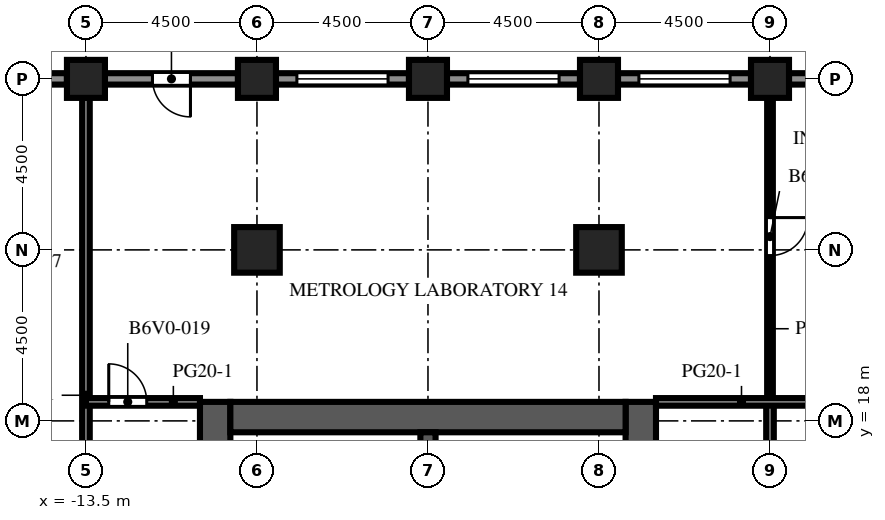
"""IFC4 building model, lengths in metres.
Left out: names, types, materials, properties, quantities, classifications, styles, units other than length and angle.
Written with IfcOpenShell. Run it as: python <this file> out.ifc"""

import sys

from ifc_helpers import new_model, si_unit, direction, frame, frame_2d, origin, origin_2d, place, context, subcontext, project, spatial, rectangle, extrude, element, fill, save


model = new_model("IFC4")
c1 = context("Model", 3, precision=1e-05, world=origin(), true_north=direction((0.0, 1.0)))
c2 = subcontext(c1, "Body", "Model", "MODEL_VIEW")
j1 = project(units=[si_unit("LENGTHUNIT", "METRE"), si_unit("PLANEANGLEUNIT", "RADIAN")], contexts=[c1])
p1 = place(None, origin())
s1 = spatial("IfcSite", under=j1, at=p1, CompositionType="ELEMENT")
p2 = place(p1, origin())
s2 = spatial("IfcBuilding", under=s1, at=p2, CompositionType="ELEMENT")
p3 = place(p2, frame((0.0, 0.0, 199.7)))
s3 = spatial("IfcBuildingStorey", under=s2, at=p3, CompositionType="ELEMENT", Elevation=199.7)
for number, where, z_axis, x_axis in (
    (1, (-13.5, 27.0, 0.0), (0.0, 0.0, 1.0), (1.0, 0.0, 0.0)),
    (2, (-9.0, 27.0, 0.0), (0.0, 0.0, 1.0), (1.0, 0.0, 0.0)),
    (3, (-4.5, 27.0, 0.0), (0.0, 0.0, 1.0), (1.0, 0.0, 0.0)),
    (4, (0.0, 27.0, 0.0), (0.0, 0.0, 1.0), (1.0, 0.0, 0.0)),
    (5, (4.5, 27.0, 0.0), (0.0, 0.0, 1.0), (1.0, 0.0, 0.0)),
):
    element("IfcColumn", number, at=place(p3, frame(where, z_axis=z_axis, x_axis=x_axis)), inside=s3, PredefinedType="COLUMN", context=c2, shape_type="SweptSolid", body=[
        extrude(rectangle(XDim=1.0, YDim=1.0, at=origin_2d()), origin(), (0.0, 0.0, 1.0), 4.1),
    ])
for number, where, z_axis, x_axis in (
    (6, (-9.0, 22.5, 0.0), (0.0, 0.0, 1.0), (1.0, 0.0, 0.0)),
    (7, (0.0, 22.5, 0.0), (0.0, 0.0, 1.0), (1.0, 0.0, 0.0)),
):
    element("IfcColumn", number, at=place(p3, frame(where, z_axis=z_axis, x_axis=x_axis)), inside=s3, PredefinedType="COLUMN", context=c2, shape_type="SweptSolid", body=[
        extrude(rectangle(XDim=1.2, YDim=1.2, at=origin_2d()), origin(), (0.0, 0.0, 1.0), 4.1),
    ])
p4 = place(p3, frame((-10.1, -9.0, 0.0), z_axis=(0.0, 0.0, 1.0), x_axis=(0.0, 1.0, 0.0)))
e8 = element("IfcWall", 8, at=p4, inside=s3, PredefinedType="SHEAR", context=c2, shape_type="SweptSolid", body=[
    extrude(rectangle(XDim=27.5, YDim=0.8, at=frame_2d((13.75, 0.0))), origin(), (0.0, 0.0, 1.0), 4.1),
])
p5 = place(p4, frame((12.55, 0.0, 0.0)))
e9 = element("IfcOpeningElement", 9, at=p5, cuts=e8, PredefinedType="OPENING", context=c2, shape_type="SweptSolid", body=[
    extrude(rectangle(XDim=2.4, YDim=2.4, at=frame_2d((1.2, 1.2))), frame((0.0, 0.41, 0.0), z_axis=(0.0, -1.0, 0.0), x_axis=(1.0, 0.0, 0.0)), (0.0, 0.0, 1.0), 0.82),
])
p6 = place(p4, frame((6.825, 0.0, 0.0)))
e10 = element("IfcOpeningElement", 10, at=p6, cuts=e8, PredefinedType="OPENING", context=c2, shape_type="SweptSolid", body=[
    extrude(rectangle(XDim=1.2, YDim=2.1, at=frame_2d((0.6, 1.05))), frame((0.0, 0.41, 0.0), z_axis=(0.0, -1.0, 0.0), x_axis=(1.0, 0.0, 0.0)), (0.0, 0.0, 1.0), 0.82),
])
p7 = place(p4, frame((19.475, 0.0, 0.0)))
e11 = element("IfcOpeningElement", 11, at=p7, cuts=e8, PredefinedType="OPENING", context=c2, shape_type="SweptSolid", body=[
    extrude(rectangle(XDim=1.2, YDim=2.1, at=frame_2d((0.6, 1.05))), frame((0.0, 0.41, 0.0), z_axis=(0.0, -1.0, 0.0), x_axis=(1.0, 0.0, 0.0)), (0.0, 0.0, 1.0), 0.82),
])
p8 = place(p3, frame((1.1, -9.0, 0.0), z_axis=(0.0, 0.0, 1.0), x_axis=(0.0, 1.0, 0.0)))
e12 = element("IfcWall", 12, at=p8, inside=s3, PredefinedType="SHEAR", context=c2, shape_type="SweptSolid", body=[
    extrude(rectangle(XDim=27.5, YDim=0.8, at=frame_2d((13.75, 0.0))), origin(), (0.0, 0.0, 1.0), 4.1),
])
p9 = place(p8, frame((12.55, 0.0, 0.0)))
e13 = element("IfcOpeningElement", 13, at=p9, cuts=e12, PredefinedType="OPENING", context=c2, shape_type="SweptSolid", body=[
    extrude(rectangle(XDim=2.4, YDim=2.4, at=frame_2d((1.2, 1.2))), frame((0.0, 0.41, 0.0), z_axis=(0.0, -1.0, 0.0), x_axis=(1.0, 0.0, 0.0)), (0.0, 0.0, 1.0), 0.82),
])
p10 = place(p8, frame((3.95, 0.0, 0.0)))
e14 = element("IfcOpeningElement", 14, at=p10, cuts=e12, PredefinedType="OPENING", context=c2, shape_type="SweptSolid", body=[
    extrude(rectangle(XDim=1.2, YDim=2.1, at=frame_2d((0.6, 1.05))), frame((0.0, 0.41, 0.0), z_axis=(0.0, -1.0, 0.0), x_axis=(1.0, 0.0, 0.0)), (0.0, 0.0, 1.0), 0.82),
])
p11 = place(p8, frame((19.45, 0.0, 0.0)))
e15 = element("IfcOpeningElement", 15, at=p11, cuts=e12, PredefinedType="OPENING", context=c2, shape_type="SweptSolid", body=[
    extrude(rectangle(XDim=1.0, YDim=2.1, at=frame_2d((0.5, 1.05))), frame((0.0, 0.41, 0.0), z_axis=(0.0, -1.0, 0.0), x_axis=(1.0, 0.0, 0.0)), (0.0, 0.0, 1.0), 0.82),
])
p12 = place(p8, frame((21.137, 0.0, 0.0)))
e16 = element("IfcOpeningElement", 16, at=p12, cuts=e12, PredefinedType="OPENING", context=c2, shape_type="SweptSolid", body=[
    extrude(rectangle(XDim=1.0, YDim=2.1, at=frame_2d((0.5, 1.05))), frame((0.0, 0.41, 0.0), z_axis=(0.0, -1.0, 0.0), x_axis=(1.0, 0.0, 0.0)), (0.0, 0.0, 1.0), 0.82),
])
p13 = place(p8, frame((23.2, 0.0, 0.0)))
e17 = element("IfcOpeningElement", 17, at=p13, cuts=e12, PredefinedType="OPENING", context=c2, shape_type="SweptSolid", body=[
    extrude(rectangle(XDim=1.0, YDim=2.1, at=frame_2d((0.5, 1.05))), frame((0.0, 0.41, 0.0), z_axis=(0.0, -1.0, 0.0), x_axis=(1.0, 0.0, 0.0)), (0.0, 0.0, 1.0), 0.82),
])
p14 = place(p8, frame((25.262, 0.0, 0.0)))
e18 = element("IfcOpeningElement", 18, at=p14, cuts=e12, PredefinedType="OPENING", context=c2, shape_type="SweptSolid", body=[
    extrude(rectangle(XDim=1.0, YDim=2.1, at=frame_2d((0.5, 1.05))), frame((0.0, 0.41, 0.0), z_axis=(0.0, -1.0, 0.0), x_axis=(1.0, 0.0, 0.0)), (0.0, 0.0, 1.0), 0.82),
])
p15 = place(p3, frame((-9.7, 18.1, 0.0), z_axis=(0.0, 0.0, 1.0), x_axis=(1.0, 0.0, 0.0)))
e19 = element("IfcWall", 19, at=p15, inside=s3, PredefinedType="SHEAR", context=c2, shape_type="SweptSolid", body=[
    extrude(rectangle(XDim=10.4, YDim=0.8, at=frame_2d((5.2, 0.0))), origin(), (0.0, 0.0, 1.0), 4.1),
])
p16 = place(p3, frame((-4.5, 10.2, 0.0), z_axis=(0.0, 0.0, 1.0), x_axis=(0.0, 1.0, 0.0)))
e20 = element("IfcWall", 20, at=p16, inside=s3, PredefinedType="SHEAR", context=c2, shape_type="SweptSolid", body=[
    extrude(rectangle(XDim=7.5, YDim=0.4, at=frame_2d((3.75, 0.0))), origin(), (0.0, 0.0, 1.0), 4.1),
])
p17 = place(p3, frame((5.0, 27.0, 0.0), z_axis=(0.0, 0.0, 1.0), x_axis=(1.0, 0.0, 0.0)))
e21 = element("IfcWall", 21, at=p17, inside=s3, PredefinedType="SOLIDWALL", context=c2, shape_type="SweptSolid", body=[
    extrude(rectangle(XDim=3.5, YDim=0.3, at=frame_2d((1.75, 0.0))), origin(), (0.0, 0.0, 1.0), 2.85),
])
p18 = place(p17, frame((0.55, 0.0, 0.8)))
e22 = element("IfcOpeningElement", 22, at=p18, cuts=e21, PredefinedType="OPENING", context=c2, shape_type="SweptSolid", body=[
    extrude(rectangle(XDim=2.4, YDim=1.7, at=frame_2d((1.2, 0.85))), frame((0.0, 0.16, 0.0), z_axis=(0.0, -1.0, 0.0), x_axis=(1.0, 0.0, 0.0)), (0.0, 0.0, 1.0), 0.32),
])
p19 = place(p3, frame((0.5, 27.0, 0.0), z_axis=(0.0, 0.0, 1.0), x_axis=(1.0, 0.0, 0.0)))
e23 = element("IfcWall", 23, at=p19, inside=s3, PredefinedType="SOLIDWALL", context=c2, shape_type="SweptSolid", body=[
    extrude(rectangle(XDim=3.5, YDim=0.3, at=frame_2d((1.75, 0.0))), origin(), (0.0, 0.0, 1.0), 2.85),
])
p20 = place(p19, frame((0.55, 0.0, 0.8)))
e24 = element("IfcOpeningElement", 24, at=p20, cuts=e23, PredefinedType="OPENING", context=c2, shape_type="SweptSolid", body=[
    extrude(rectangle(XDim=2.4, YDim=1.7, at=frame_2d((1.2, 0.85))), frame((0.0, 0.16, 0.0), z_axis=(0.0, -1.0, 0.0), x_axis=(1.0, 0.0, 0.0)), (0.0, 0.0, 1.0), 0.32),
])
p21 = place(p3, frame((-4.0, 27.0, 0.0), z_axis=(0.0, 0.0, 1.0), x_axis=(1.0, 0.0, 0.0)))
e25 = element("IfcWall", 25, at=p21, inside=s3, PredefinedType="SOLIDWALL", context=c2, shape_type="SweptSolid", body=[
    extrude(rectangle(XDim=3.5, YDim=0.3, at=frame_2d((1.75, 0.0))), origin(), (0.0, 0.0, 1.0), 2.85),
])
p22 = place(p21, frame((0.55, 0.0, 0.8)))
e26 = element("IfcOpeningElement", 26, at=p22, cuts=e25, PredefinedType="OPENING", context=c2, shape_type="SweptSolid", body=[
    extrude(rectangle(XDim=2.4, YDim=1.7, at=frame_2d((1.2, 0.85))), frame((0.0, 0.16, 0.0), z_axis=(0.0, -1.0, 0.0), x_axis=(1.0, 0.0, 0.0)), (0.0, 0.0, 1.0), 0.32),
])
p23 = place(p3, frame((-8.5, 27.0, 0.0), z_axis=(0.0, 0.0, 1.0), x_axis=(1.0, 0.0, 0.0)))
e27 = element("IfcWall", 27, at=p23, inside=s3, PredefinedType="SOLIDWALL", context=c2, shape_type="SweptSolid", body=[
    extrude(rectangle(XDim=3.5, YDim=0.3, at=frame_2d((1.75, 0.0))), origin(), (0.0, 0.0, 1.0), 2.85),
])
p24 = place(p23, frame((0.55, 0.0, 0.8)))
e28 = element("IfcOpeningElement", 28, at=p24, cuts=e27, PredefinedType="OPENING", context=c2, shape_type="SweptSolid", body=[
    extrude(rectangle(XDim=2.4, YDim=1.7, at=frame_2d((1.2, 0.85))), frame((0.0, 0.16, 0.0), z_axis=(0.0, -1.0, 0.0), x_axis=(1.0, 0.0, 0.0)), (0.0, 0.0, 1.0), 0.32),
])
p25 = place(p3, frame((-13.0, 27.0, 0.0), z_axis=(0.0, 0.0, 1.0), x_axis=(1.0, 0.0, 0.0)))
e29 = element("IfcWall", 29, at=p25, inside=s3, PredefinedType="SOLIDWALL", context=c2, shape_type="SweptSolid", body=[
    extrude(rectangle(XDim=3.5, YDim=0.3, at=frame_2d((1.75, 0.0))), origin(), (0.0, 0.0, 1.0), 2.85),
])
p26 = place(p25, frame((1.25, 0.0, 0.0)))
e30 = element("IfcOpeningElement", 30, at=p26, cuts=e29, PredefinedType="OPENING", context=c2, shape_type="SweptSolid", body=[
    extrude(rectangle(XDim=1.0, YDim=2.2, at=frame_2d((0.5, 1.1))), frame((0.0, 0.16, 0.0), z_axis=(0.0, -1.0, 0.0), x_axis=(1.0, 0.0, 0.0)), (0.0, 0.0, 1.0), 0.32),
])
p27 = place(p3, frame((-17.5, 27.0, 0.0), z_axis=(0.0, 0.0, 1.0), x_axis=(1.0, 0.0, 0.0)))
e31 = element("IfcWall", 31, at=p27, inside=s3, PredefinedType="SOLIDWALL", context=c2, shape_type="SweptSolid", body=[
    extrude(rectangle(XDim=3.5, YDim=0.3, at=frame_2d((1.75, 0.0))), origin(), (0.0, 0.0, 1.0), 2.85),
])
p28 = place(p27, frame((0.55, 0.0, 0.8)))
e32 = element("IfcOpeningElement", 32, at=p28, cuts=e31, PredefinedType="OPENING", context=c2, shape_type="SweptSolid", body=[
    extrude(rectangle(XDim=2.4, YDim=1.7, at=frame_2d((1.2, 0.85))), frame((0.0, 0.16, 0.0), z_axis=(0.0, -1.0, 0.0), x_axis=(1.0, 0.0, 0.0)), (0.0, 0.0, 1.0), 0.32),
])
p29 = place(p3, frame((-13.5, 6.25, 0.0), z_axis=(0.0, 0.0, 1.0), x_axis=(0.0, 1.0, 0.0)))
e33 = element("IfcWall", 33, at=p29, inside=s3, PredefinedType="PARTITIONING", context=c2, shape_type="SweptSolid", body=[
    extrude(rectangle(XDim=20.25, YDim=0.2, at=frame_2d((10.125, 0.0))), origin(), (0.0, 0.0, 1.0), 3.65),
])
p30 = place(p29, frame((3.6, 0.0, 0.0)))
e34 = element("IfcOpeningElement", 34, at=p30, cuts=e33, PredefinedType="OPENING", context=c2, shape_type="SweptSolid", body=[
    extrude(rectangle(XDim=1.0, YDim=2.1, at=frame_2d((0.5, 1.05))), frame((0.0, 0.11, 0.0), z_axis=(0.0, -1.0, 0.0), x_axis=(1.0, 0.0, 0.0)), (0.0, 0.0, 1.0), 0.22),
])
p31 = place(p3, frame((4.5, 26.5, 0.0), z_axis=(0.0, 0.0, 1.0), x_axis=(0.0, -1.0, 0.0)))
e35 = element("IfcWall", 35, at=p31, inside=s3, PredefinedType="PARTITIONING", context=c2, shape_type="SweptSolid", body=[
    extrude(rectangle(XDim=8.0, YDim=0.15, at=frame_2d((4.0, 0.0))), origin(), (0.0, 0.0, 1.0), 3.65),
])
p32 = place(p31, frame((3.15, 0.0, 0.0)))
e36 = element("IfcOpeningElement", 36, at=p32, cuts=e35, PredefinedType="OPENING", context=c2, shape_type="SweptSolid", body=[
    extrude(rectangle(XDim=1.0, YDim=2.1, at=frame_2d((0.5, 1.05))), frame((0.0, 0.085, 0.0), z_axis=(0.0, -1.0, 0.0), x_axis=(1.0, 0.0, 0.0)), (0.0, 0.0, 1.0), 0.17),
])
p33 = place(p3, frame((4.5, 18.5, 0.0), z_axis=(0.0, 0.0, 1.0), x_axis=(0.0, -1.0, 0.0)))
e37 = element("IfcWall", 37, at=p33, inside=s3, PredefinedType="PARTITIONING", context=c2, shape_type="SweptSolid", body=[
    extrude(rectangle(XDim=11.8, YDim=0.2, at=frame_2d((5.9, 0.0))), origin(), (0.0, 0.0, 1.0), 3.65),
])
p34 = place(p33, frame((4.95, 0.0, 0.0)))
e38 = element("IfcOpeningElement", 38, at=p34, cuts=e37, PredefinedType="OPENING", context=c2, shape_type="SweptSolid", body=[
    extrude(rectangle(XDim=1.0, YDim=2.1, at=frame_2d((0.5, 1.05))), frame((0.0, 0.11, 0.0), z_axis=(0.0, -1.0, 0.0), x_axis=(1.0, 0.0, 0.0)), (0.0, 0.0, 1.0), 0.22),
])
p35 = place(p3, frame((-13.5, 18.5, 0.0), z_axis=(0.0, 0.0, 1.0), x_axis=(1.0, 0.0, 0.0)))
e39 = element("IfcWall", 39, at=p35, inside=s3, PredefinedType="PARTITIONING", context=c2, shape_type="SweptSolid", body=[
    extrude(rectangle(XDim=3.0, YDim=0.2, at=frame_2d((1.5, 0.0))), origin(), (0.0, 0.0, 1.0), 3.65),
])
p36 = place(p35, frame((0.6, 0.0, 0.0)))
e40 = element("IfcOpeningElement", 40, at=p36, cuts=e39, PredefinedType="OPENING", context=c2, shape_type="SweptSolid", body=[
    extrude(rectangle(XDim=1.0, YDim=2.1, at=frame_2d((0.5, 1.05))), frame((0.0, 0.11, 0.0), z_axis=(0.0, -1.0, 0.0), x_axis=(1.0, 0.0, 0.0)), (0.0, 0.0, 1.0), 0.22),
])
p37 = place(p3, frame((1.5, 18.5, 0.0), z_axis=(0.0, 0.0, 1.0), x_axis=(1.0, 0.0, 0.0)))
e41 = element("IfcWall", 41, at=p37, inside=s3, PredefinedType="PARTITIONING", context=c2, shape_type="SweptSolid", body=[
    extrude(rectangle(XDim=4.5, YDim=0.2, at=frame_2d((2.25, 0.0))), origin(), (0.0, 0.0, 1.0), 3.65),
])
p38 = place(p20, origin())
e42 = element("IfcWindow", 42, at=p38, inside=s3, PartitioningType="SINGLE_PANEL", PredefinedType="WINDOW", context=c2, shape_type="SweptSolid", body=[
    extrude(rectangle(XDim=2.4, YDim=1.7, at=frame_2d((1.2, 0.85))), frame((0.0, 0.03, 0.0), z_axis=(0.0, -1.0, 0.0), x_axis=(1.0, 0.0, 0.0)), (0.0, 0.0, 1.0), 0.06),
])
fill(e24, e42)
p39 = place(p22, origin())
e43 = element("IfcWindow", 43, at=p39, inside=s3, PartitioningType="SINGLE_PANEL", PredefinedType="WINDOW", context=c2, shape_type="SweptSolid", body=[
    extrude(rectangle(XDim=2.4, YDim=1.7, at=frame_2d((1.2, 0.85))), frame((0.0, 0.03, 0.0), z_axis=(0.0, -1.0, 0.0), x_axis=(1.0, 0.0, 0.0)), (0.0, 0.0, 1.0), 0.06),
])
fill(e26, e43)
p40 = place(p24, origin())
e44 = element("IfcWindow", 44, at=p40, inside=s3, PartitioningType="SINGLE_PANEL", PredefinedType="WINDOW", context=c2, shape_type="SweptSolid", body=[
    extrude(rectangle(XDim=2.4, YDim=1.7, at=frame_2d((1.2, 0.85))), frame((0.0, 0.03, 0.0), z_axis=(0.0, -1.0, 0.0), x_axis=(1.0, 0.0, 0.0)), (0.0, 0.0, 1.0), 0.06),
])
fill(e28, e44)
p41 = place(p26, origin())
e45 = element("IfcDoor", 45, at=p41, inside=s3, OperationType="SINGLE_SWING_RIGHT", PredefinedType="DOOR", context=c2, shape_type="SweptSolid", body=[
    extrude(rectangle(XDim=1.0, YDim=2.2, at=frame_2d((0.5, 1.1))), frame((0.0, 0.025, 0.0), z_axis=(0.0, -1.0, 0.0), x_axis=(1.0, 0.0, 0.0)), (0.0, 0.0, 1.0), 0.05),
])
fill(e30, e45)
p42 = place(p32, origin())
e46 = element("IfcDoor", 46, at=p42, inside=s3, OperationType="SINGLE_SWING_LEFT", PredefinedType="DOOR", context=c2, shape_type="SweptSolid", body=[
    extrude(rectangle(XDim=1.0, YDim=2.1, at=frame_2d((0.5, 1.05))), frame((0.0, 0.025, 0.0), z_axis=(0.0, -1.0, 0.0), x_axis=(1.0, 0.0, 0.0)), (0.0, 0.0, 1.0), 0.05),
])
fill(e36, e46)
p43 = place(p36, origin())
e47 = element("IfcDoor", 47, at=p43, inside=s3, OperationType="SINGLE_SWING_LEFT", PredefinedType="DOOR", context=c2, shape_type="SweptSolid", body=[
    extrude(rectangle(XDim=1.0, YDim=2.1, at=frame_2d((0.5, 1.05))), frame((0.0, 0.025, 0.0), z_axis=(0.0, -1.0, 0.0), x_axis=(1.0, 0.0, 0.0)), (0.0, 0.0, 1.0), 0.05),
])
fill(e40, e47)
save(model, sys.argv[1])
